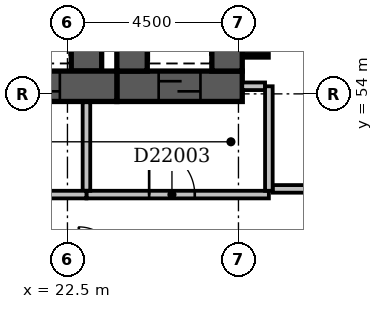
"""IFC4 building model, lengths in metres.
Left out: names, types, materials, properties, quantities, classifications, styles, units other than length and angle.
Written with IfcOpenShell. Run it as: python <this file> out.ifc"""

import sys

from ifc_helpers import new_model, si_unit, direction, frame, frame_2d, origin, place, context, subcontext, project, spatial, rectangle, extrude, element, fill, save


model = new_model("IFC4")
c1 = context("Model", 3, precision=1e-05, world=origin(), true_north=direction((0.0, 1.0)))
c2 = subcontext(c1, "Body", "Model", "MODEL_VIEW")
j1 = project(units=[si_unit("LENGTHUNIT", "METRE"), si_unit("PLANEANGLEUNIT", "RADIAN")], contexts=[c1])
p1 = place(None, origin())
s1 = spatial("IfcSite", under=j1, at=p1, CompositionType="ELEMENT")
p2 = place(p1, origin())
s2 = spatial("IfcBuilding", under=s1, at=p2, CompositionType="ELEMENT")
p3 = place(p2, frame((0.0, 0.0, 90.2)))
s3 = spatial("IfcBuildingStorey", under=s2, at=p3, CompositionType="ELEMENT", Elevation=90.2)
p4 = place(p3, frame((7.35, 54.2, -0.3), z_axis=(0.0, 0.0, 1.0), x_axis=(1.0, 0.0, 0.0)))
e1 = element("IfcWall", 1, at=p4, inside=s3, PredefinedType="SHEAR", context=c2, shape_type="SweptSolid", body=[
    extrude(rectangle(XDim=16.45, YDim=0.8, at=frame_2d((8.225, 0.0))), origin(), (0.0, 0.0, 1.0), 3.6),
])
p5 = place(p4, frame((1.35, 0.0, 0.3)))
e2 = element("IfcOpeningElement", 2, at=p5, cuts=e1, PredefinedType="OPENING", context=c2, shape_type="SweptSolid", body=[
    extrude(rectangle(XDim=1.1, YDim=2.1, at=frame_2d((0.55, 1.05))), frame((0.0, 0.412, 0.0), z_axis=(0.0, -1.0, 0.0), x_axis=(1.0, 0.0, 0.0)), (0.0, 0.0, 1.0), 0.824),
])
p6 = place(p4, frame((3.85, 0.0, 0.3)))
e3 = element("IfcOpeningElement", 3, at=p6, cuts=e1, PredefinedType="OPENING", context=c2, shape_type="SweptSolid", body=[
    extrude(rectangle(XDim=1.1, YDim=2.1, at=frame_2d((0.55, 1.05))), frame((0.0, 0.412, 0.0), z_axis=(0.0, -1.0, 0.0), x_axis=(1.0, 0.0, 0.0)), (0.0, 0.0, 1.0), 0.824),
])
p7 = place(p4, frame((6.35, 0.0, 0.3)))
e4 = element("IfcOpeningElement", 4, at=p7, cuts=e1, PredefinedType="OPENING", context=c2, shape_type="SweptSolid", body=[
    extrude(rectangle(XDim=1.1, YDim=2.1, at=frame_2d((0.55, 1.05))), frame((0.0, 0.412, 0.0), z_axis=(0.0, -1.0, 0.0), x_axis=(1.0, 0.0, 0.0)), (0.0, 0.0, 1.0), 0.824),
])
p8 = place(p4, frame((8.85, 0.0, 0.3)))
e5 = element("IfcOpeningElement", 5, at=p8, cuts=e1, PredefinedType="OPENING", context=c2, shape_type="SweptSolid", body=[
    extrude(rectangle(XDim=1.1, YDim=2.1, at=frame_2d((0.55, 1.05))), frame((0.0, 0.412, 0.0), z_axis=(0.0, -1.0, 0.0), x_axis=(1.0, 0.0, 0.0)), (0.0, 0.0, 1.0), 0.824),
])
p9 = place(p4, frame((11.35, 0.0, 0.3)))
e6 = element("IfcOpeningElement", 6, at=p9, cuts=e1, PredefinedType="OPENING", context=c2, shape_type="SweptSolid", body=[
    extrude(rectangle(XDim=1.1, YDim=2.1, at=frame_2d((0.55, 1.05))), frame((0.0, 0.412, 0.0), z_axis=(0.0, -1.0, 0.0), x_axis=(1.0, 0.0, 0.0)), (0.0, 0.0, 1.0), 0.824),
])
p10 = place(p4, frame((13.85, 0.0, 0.3)))
e7 = element("IfcOpeningElement", 7, at=p10, cuts=e1, PredefinedType="OPENING", context=c2, shape_type="SweptSolid", body=[
    extrude(rectangle(XDim=1.1, YDim=2.1, at=frame_2d((0.55, 1.05))), frame((0.0, 0.412, 0.0), z_axis=(0.0, -1.0, 0.0), x_axis=(1.0, 0.0, 0.0)), (0.0, 0.0, 1.0), 0.824),
])
p11 = place(p3, frame((23.0, 54.6, -0.3), z_axis=(0.0, 0.0, 1.0), x_axis=(0.0, 1.0, 0.0)))
e8 = element("IfcWall", 8, at=p11, inside=s3, PredefinedType="SHEAR", context=c2, shape_type="SweptSolid", body=[
    extrude(rectangle(XDim=3.0, YDim=0.8, at=frame_2d((1.5, 0.0))), origin(), (0.0, 0.0, 1.0), 3.6),
])
p12 = place(p3, frame((23.8, 54.2, -0.3), z_axis=(0.0, 0.0, 1.0), x_axis=(1.0, 0.0, 0.0)))
e9 = element("IfcWall", 9, at=p12, inside=s3, PredefinedType="SHEAR", context=c2, shape_type="SweptSolid", body=[
    extrude(rectangle(XDim=3.3, YDim=0.8, at=frame_2d((1.65, 0.0))), origin(), (0.0, 0.0, 1.0), 3.6),
])
p13 = place(p12, frame((1.1, 0.0, 0.3)))
e10 = element("IfcOpeningElement", 10, at=p13, cuts=e9, PredefinedType="OPENING", context=c2, shape_type="SweptSolid", body=[
    extrude(rectangle(XDim=1.1, YDim=2.1, at=frame_2d((0.55, 1.05))), frame((0.0, 0.412, 0.0), z_axis=(0.0, -1.0, 0.0), x_axis=(1.0, 0.0, 0.0)), (0.0, 0.0, 1.0), 0.824),
])
for number, where, z_axis, x_axis in (
    (11, (24.2, 54.6, -0.3), (0.0, 0.0, 1.0), (0.0, 1.0, 0.0)),
    (12, (26.7, 54.6, -0.3), (0.0, 0.0, 1.0), (0.0, 1.0, 0.0)),
):
    element("IfcWall", number, at=place(p3, frame(where, z_axis=z_axis, x_axis=x_axis)), inside=s3, PredefinedType="SHEAR", context=c2, shape_type="SweptSolid", body=[
        extrude(rectangle(XDim=3.0, YDim=0.8, at=frame_2d((1.5, 0.0))), origin(), (0.0, 0.0, 1.0), 3.6),
    ])
p14 = place(p3, frame((8.0, 51.35, 0.0), z_axis=(0.0, 0.0, 1.0), x_axis=(1.0, 0.0, 0.0)))
e13 = element("IfcWall", 13, at=p14, inside=s3, PredefinedType="PARTITIONING", context=c2, shape_type="SweptSolid", body=[
    extrude(rectangle(XDim=15.0, YDim=0.2, at=frame_2d((7.5, 0.0))), origin(), (0.0, 0.0, 1.0), 3.3),
])
p15 = place(p14, frame((3.4, 0.0, 0.0)))
e14 = element("IfcOpeningElement", 14, at=p15, cuts=e13, PredefinedType="OPENING", context=c2, shape_type="SweptSolid", body=[
    extrude(rectangle(XDim=1.2, YDim=2.1, at=frame_2d((0.6, 1.05))), frame((0.0, 0.112, 0.0), z_axis=(0.0, -1.0, 0.0), x_axis=(1.0, 0.0, 0.0)), (0.0, 0.0, 1.0), 0.224),
])
p16 = place(p14, frame((9.4, 0.0, 0.0)))
e15 = element("IfcOpeningElement", 15, at=p16, cuts=e13, PredefinedType="OPENING", context=c2, shape_type="SweptSolid", body=[
    extrude(rectangle(XDim=1.2, YDim=2.1, at=frame_2d((0.6, 1.05))), frame((0.0, 0.112, 0.0), z_axis=(0.0, -1.0, 0.0), x_axis=(1.0, 0.0, 0.0)), (0.0, 0.0, 1.0), 0.224),
])
p17 = place(p3, frame((23.0, 51.45, 0.0), z_axis=(0.0, 0.0, 1.0), x_axis=(0.0, 1.0, 0.0)))
e16 = element("IfcWall", 16, at=p17, inside=s3, PredefinedType="PARTITIONING", context=c2, shape_type="SweptSolid", body=[
    extrude(rectangle(XDim=2.33, YDim=0.2, at=frame_2d((1.165, 0.0))), origin(), (0.0, 0.0, 1.0), 3.3),
])
p18 = place(p3, frame((23.0, 51.35, 0.0), z_axis=(0.0, 0.0, 1.0), x_axis=(1.0, 0.0, 0.0)))
e17 = element("IfcWall", 17, at=p18, inside=s3, PredefinedType="PARTITIONING", context=c2, shape_type="SweptSolid", body=[
    extrude(rectangle(XDim=4.8, YDim=0.2, at=frame_2d((2.4, 0.0))), origin(), (0.0, 0.0, 1.0), 3.3),
])
p19 = place(p18, frame((1.65, 0.0, 0.0)))
e18 = element("IfcOpeningElement", 18, at=p19, cuts=e17, PredefinedType="OPENING", context=c2, shape_type="SweptSolid", body=[
    extrude(rectangle(XDim=1.2, YDim=2.1, at=frame_2d((0.6, 1.05))), frame((0.0, 0.112, 0.0), z_axis=(0.0, -1.0, 0.0), x_axis=(1.0, 0.0, 0.0)), (0.0, 0.0, 1.0), 0.224),
])
p20 = place(p3, frame((27.8, 51.45, 0.0), z_axis=(0.0, 0.0, 1.0), x_axis=(0.0, 1.0, 0.0)))
e19 = element("IfcWall", 19, at=p20, inside=s3, PredefinedType="PARTITIONING", context=c2, shape_type="SweptSolid", body=[
    extrude(rectangle(XDim=2.75, YDim=0.2, at=frame_2d((1.375, 0.0))), origin(), (0.0, 0.0, 1.0), 3.3),
])
p21 = place(p3, frame((27.1, 54.2, 0.0), z_axis=(0.0, 0.0, 1.0), x_axis=(1.0, 0.0, 0.0)))
e20 = element("IfcWall", 20, at=p21, inside=s3, PredefinedType="PARTITIONING", context=c2, shape_type="SweptSolid", body=[
    extrude(rectangle(XDim=0.6, YDim=0.2, at=frame_2d((0.3, 0.0))), origin(), (0.0, 0.0, 1.0), 3.3),
])
p22 = place(p3, frame((27.9, 51.5, 0.0), z_axis=(0.0, 0.0, 1.0), x_axis=(1.0, 0.0, 0.0)))
e21 = element("IfcWall", 21, at=p22, inside=s3, PredefinedType="PARTITIONING", context=c2, shape_type="SweptSolid", body=[
    extrude(rectangle(XDim=9.3, YDim=0.2, at=frame_2d((4.65, 0.0))), origin(), (0.0, 0.0, 1.0), 3.3),
])
p23 = place(p22, frame((4.2, 0.0, 0.0)))
e22 = element("IfcOpeningElement", 22, at=p23, cuts=e21, PredefinedType="OPENING", context=c2, shape_type="SweptSolid", body=[
    extrude(rectangle(XDim=0.9, YDim=2.1, at=frame_2d((0.45, 1.05))), frame((0.0, 0.112, 0.0), z_axis=(0.0, -1.0, 0.0), x_axis=(1.0, 0.0, 0.0)), (0.0, 0.0, 1.0), 0.224),
])
p24 = place(p3, frame((27.1, 55.0, 0.0), z_axis=(0.0, 0.0, 1.0), x_axis=(1.0, 0.0, 0.0)))
e23 = element("IfcWall", 23, at=p24, inside=s3, PredefinedType="PARTITIONING", context=c2, shape_type="SweptSolid", body=[
    extrude(rectangle(XDim=0.7, YDim=0.1, at=frame_2d((0.35, 0.0))), origin(), (0.0, 0.0, 1.0), 3.3),
])
p25 = place(p19, origin())
e24 = element("IfcDoor", 24, at=p25, inside=s3, OperationType="SINGLE_SWING_LEFT", PredefinedType="DOOR", context=c2, shape_type="SweptSolid", body=[
    extrude(rectangle(XDim=1.2, YDim=2.1, at=frame_2d((0.6, 1.05))), frame((0.0, 0.025, 0.0), z_axis=(0.0, -1.0, 0.0), x_axis=(1.0, 0.0, 0.0)), (0.0, 0.0, 1.0), 0.05),
])
fill(e18, e24)
p26 = place(p13, origin())
e25 = element("IfcDoor", 25, at=p26, inside=s3, OperationType="SLIDING_TO_LEFT", PredefinedType="DOOR", context=c2, shape_type="SweptSolid", body=[
    extrude(rectangle(XDim=1.1, YDim=2.1, at=frame_2d((0.55, 1.05))), frame((0.0, 0.025, 0.0), z_axis=(0.0, -1.0, 0.0), x_axis=(1.0, 0.0, 0.0)), (0.0, 0.0, 1.0), 0.05),
])
fill(e10, e25)
p27 = place(p10, origin())
e26 = element("IfcDoor", 26, at=p27, inside=s3, OperationType="SLIDING_TO_LEFT", PredefinedType="DOOR", context=c2, shape_type="SweptSolid", body=[
    extrude(rectangle(XDim=1.1, YDim=2.1, at=frame_2d((0.55, 1.05))), frame((0.0, 0.025, 0.0), z_axis=(0.0, -1.0, 0.0), x_axis=(1.0, 0.0, 0.0)), (0.0, 0.0, 1.0), 0.05),
])
fill(e7, e26)
save(model, sys.argv[1])
